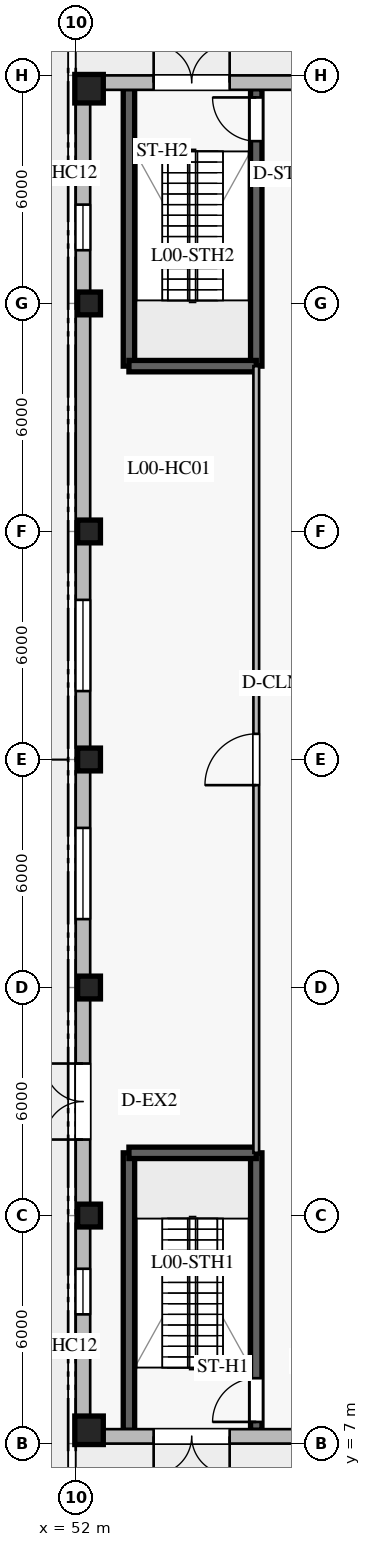
"""IFC4 building model, lengths in metres.
Left out: names, types, materials, properties, quantities, classifications, styles, units other than length and angle.
Written with IfcOpenShell. Run it as: python <this file> out.ifc"""

import sys

from ifc_helpers import new_model, si_unit, direction, frame, frame_2d, origin, origin_2d, place, context, subcontext, project, spatial, rectangle, extrude, element, fill, save


model = new_model("IFC4")
c1 = context("Model", 3, precision=1e-05, world=origin(), true_north=direction((0.0, 1.0)))
c2 = subcontext(c1, "Body", "Model", "MODEL_VIEW")
j1 = project(units=[si_unit("LENGTHUNIT", "METRE"), si_unit("PLANEANGLEUNIT", "RADIAN")], contexts=[c1])
p1 = place(None, origin())
s1 = spatial("IfcSite", under=j1, at=p1, CompositionType="ELEMENT")
p2 = place(p1, origin())
s2 = spatial("IfcBuilding", under=s1, at=p2, CompositionType="ELEMENT")
p3 = place(p2, origin())
s3 = spatial("IfcBuildingStorey", under=s2, at=p3, CompositionType="ELEMENT", Elevation=0.0)
p4 = place(p3, frame((56.75, 7.35, 0.0), z_axis=(0.0, 0.0, 1.0), x_axis=(0.0, 1.0, 0.0)))
e1 = element("IfcWall", 1, at=p4, inside=s3, PredefinedType="SOLIDWALL", context=c2, shape_type="SweptSolid", body=[
    extrude(rectangle(XDim=7.3, YDim=0.3, at=frame_2d((3.65, 0.0))), origin(), (0.0, 0.0, 1.0), 4.94),
])
p5 = place(p4, frame((0.22, 0.0, 0.0)))
e2 = element("IfcOpeningElement", 2, at=p5, cuts=e1, PredefinedType="OPENING", context=c2, shape_type="SweptSolid", body=[
    extrude(rectangle(XDim=1.15, YDim=2.2, at=frame_2d((0.575, 1.1))), frame((0.0, 0.16, 0.0), z_axis=(0.0, -1.0, 0.0), x_axis=(1.0, 0.0, 0.0)), (0.0, 0.0, 1.0), 0.32),
])
p6 = place(p3, frame((53.4, 7.35, 0.0), z_axis=(0.0, 0.0, 1.0), x_axis=(0.0, 1.0, 0.0)))
e3 = element("IfcWall", 3, at=p6, inside=s3, PredefinedType="SOLIDWALL", context=c2, shape_type="SweptSolid", body=[
    extrude(rectangle(XDim=7.3, YDim=0.3, at=frame_2d((3.65, 0.0))), origin(), (0.0, 0.0, 1.0), 4.94),
])
p7 = place(p3, frame((53.4, 14.65, 0.0), z_axis=(0.0, 0.0, 1.0), x_axis=(1.0, 0.0, 0.0)))
e4 = element("IfcWall", 4, at=p7, inside=s3, PredefinedType="SOLIDWALL", context=c2, shape_type="SweptSolid", body=[
    extrude(rectangle(XDim=3.35, YDim=0.3, at=frame_2d((1.675, 0.0))), origin(), (0.0, 0.0, 1.0), 4.94),
])
p8 = place(p3, frame((56.75, 35.35, 0.0), z_axis=(0.0, 0.0, 1.0), x_axis=(0.0, 1.0, 0.0)))
e5 = element("IfcWall", 5, at=p8, inside=s3, PredefinedType="SOLIDWALL", context=c2, shape_type="SweptSolid", body=[
    extrude(rectangle(XDim=7.3, YDim=0.3, at=frame_2d((3.65, 0.0))), origin(), (0.0, 0.0, 1.0), 4.94),
])
p9 = place(p8, frame((5.92, 0.0, 0.0)))
e6 = element("IfcOpeningElement", 6, at=p9, cuts=e5, PredefinedType="OPENING", context=c2, shape_type="SweptSolid", body=[
    extrude(rectangle(XDim=1.15, YDim=2.2, at=frame_2d((0.575, 1.1))), frame((0.0, 0.16, 0.0), z_axis=(0.0, -1.0, 0.0), x_axis=(1.0, 0.0, 0.0)), (0.0, 0.0, 1.0), 0.32),
])
p10 = place(p3, frame((53.4, 35.35, 0.0), z_axis=(0.0, 0.0, 1.0), x_axis=(0.0, 1.0, 0.0)))
e7 = element("IfcWall", 7, at=p10, inside=s3, PredefinedType="SOLIDWALL", context=c2, shape_type="SweptSolid", body=[
    extrude(rectangle(XDim=7.3, YDim=0.3, at=frame_2d((3.65, 0.0))), origin(), (0.0, 0.0, 1.0), 4.94),
])
p11 = place(p3, frame((53.4, 35.35, 0.0), z_axis=(0.0, 0.0, 1.0), x_axis=(1.0, 0.0, 0.0)))
e8 = element("IfcWall", 8, at=p11, inside=s3, PredefinedType="SOLIDWALL", context=c2, shape_type="SweptSolid", body=[
    extrude(rectangle(XDim=3.35, YDim=0.3, at=frame_2d((1.675, 0.0))), origin(), (0.0, 0.0, 1.0), 4.94),
])
p12 = place(p3, frame((52.35, 7.35, 0.0), z_axis=(0.0, 0.0, 1.0), x_axis=(1.0, 0.0, 0.0)))
e9 = element("IfcColumn", 9, at=p12, inside=s3, PredefinedType="COLUMN", context=c2, shape_type="SweptSolid", body=[
    extrude(rectangle(XDim=0.75, YDim=0.75, at=origin_2d()), origin(), (0.0, 0.0, 1.0), 5.2),
])
for number, where, z_axis, x_axis in (
    (10, (52.35, 13.0, 0.0), (0.0, 0.0, 1.0), (1.0, 0.0, 0.0)),
    (11, (52.35, 19.0, 0.0), (0.0, 0.0, 1.0), (1.0, 0.0, 0.0)),
    (12, (52.35, 25.0, 0.0), (0.0, 0.0, 1.0), (1.0, 0.0, 0.0)),
    (13, (52.35, 31.0, 0.0), (0.0, 0.0, 1.0), (1.0, 0.0, 0.0)),
    (14, (52.35, 37.0, 0.0), (0.0, 0.0, 1.0), (1.0, 0.0, 0.0)),
):
    element("IfcColumn", number, at=place(p3, frame(where, z_axis=z_axis, x_axis=x_axis)), inside=s3, PredefinedType="COLUMN", context=c2, shape_type="SweptSolid", body=[
        extrude(rectangle(XDim=0.6, YDim=0.6, at=origin_2d()), origin(), (0.0, 0.0, 1.0), 5.2),
    ])
p13 = place(p3, frame((52.35, 42.65, 0.0), z_axis=(0.0, 0.0, 1.0), x_axis=(1.0, 0.0, 0.0)))
e15 = element("IfcColumn", 15, at=p13, inside=s3, PredefinedType="COLUMN", context=c2, shape_type="SweptSolid", body=[
    extrude(rectangle(XDim=0.75, YDim=0.75, at=origin_2d()), origin(), (0.0, 0.0, 1.0), 5.2),
])
p14 = place(p3, frame((75.0, 7.19, 0.0), z_axis=(0.0, 0.0, 1.0), x_axis=(-1.0, 0.0, 0.0)))
e16 = element("IfcWall", 16, at=p14, inside=s3, PredefinedType="STANDARD", context=c2, shape_type="SweptSolid", body=[
    extrude(rectangle(XDim=23.0, YDim=0.38, at=frame_2d((11.5, 0.0))), origin(), (0.0, 0.0, 1.0), 4.94),
])
p15 = place(p14, frame((18.95, 0.0, 0.0)))
e17 = element("IfcOpeningElement", 17, at=p15, cuts=e16, PredefinedType="OPENING", context=c2, shape_type="SweptSolid", body=[
    extrude(rectangle(XDim=2.0, YDim=2.4, at=frame_2d((1.0, 1.2))), frame((0.0, 0.2, 0.0), z_axis=(0.0, -1.0, 0.0), x_axis=(1.0, 0.0, 0.0)), (0.0, 0.0, 1.0), 0.4),
])
p16 = place(p14, frame((10.3, 0.0, 0.95)))
e18 = element("IfcOpeningElement", 18, at=p16, cuts=e16, PredefinedType="OPENING", context=c2, shape_type="SweptSolid", body=[
    extrude(rectangle(XDim=2.4, YDim=1.8, at=frame_2d((1.2, 0.9))), frame((0.0, 0.2, 0.0), z_axis=(0.0, -1.0, 0.0), x_axis=(1.0, 0.0, 0.0)), (0.0, 0.0, 1.0), 0.4),
])
p17 = place(p3, frame((52.0, 42.81, 0.0), z_axis=(0.0, 0.0, 1.0), x_axis=(1.0, 0.0, 0.0)))
e19 = element("IfcWall", 19, at=p17, inside=s3, PredefinedType="STANDARD", context=c2, shape_type="SweptSolid", body=[
    extrude(rectangle(XDim=23.0, YDim=0.38, at=frame_2d((11.5, 0.0))), origin(), (0.0, 0.0, 1.0), 4.94),
])
p18 = place(p17, frame((2.05, 0.0, 0.0)))
e20 = element("IfcOpeningElement", 20, at=p18, cuts=e19, PredefinedType="OPENING", context=c2, shape_type="SweptSolid", body=[
    extrude(rectangle(XDim=2.0, YDim=2.4, at=frame_2d((1.0, 1.2))), frame((0.0, 0.2, 0.0), z_axis=(0.0, -1.0, 0.0), x_axis=(1.0, 0.0, 0.0)), (0.0, 0.0, 1.0), 0.4),
])
p19 = place(p17, frame((16.05, 0.0, 0.0)))
e21 = element("IfcOpeningElement", 21, at=p19, cuts=e19, PredefinedType="OPENING", context=c2, shape_type="SweptSolid", body=[
    extrude(rectangle(XDim=6.0, YDim=2.6, at=frame_2d((3.0, 1.3))), frame((0.0, 0.2, 0.0), z_axis=(0.0, -1.0, 0.0), x_axis=(1.0, 0.0, 0.0)), (0.0, 0.0, 1.0), 0.4),
])
p20 = place(p3, frame((52.19, 7.38, 0.0), z_axis=(0.0, 0.0, 1.0), x_axis=(0.0, 1.0, 0.0)))
e22 = element("IfcWall", 22, at=p20, inside=s3, PredefinedType="STANDARD", context=c2, shape_type="SweptSolid", body=[
    extrude(rectangle(XDim=35.24, YDim=0.38, at=frame_2d((17.62, 0.0))), origin(), (0.0, 0.0, 1.0), 4.94),
])
p21 = place(p20, frame((7.62, 0.0, 0.0)))
e23 = element("IfcOpeningElement", 23, at=p21, cuts=e22, PredefinedType="OPENING", context=c2, shape_type="SweptSolid", body=[
    extrude(rectangle(XDim=2.0, YDim=2.5, at=frame_2d((1.0, 1.25))), frame((0.0, 0.2, 0.0), z_axis=(0.0, -1.0, 0.0), x_axis=(1.0, 0.0, 0.0)), (0.0, 0.0, 1.0), 0.4),
])
p22 = place(p20, frame((3.02, 0.0, 0.95)))
e24 = element("IfcOpeningElement", 24, at=p22, cuts=e22, PredefinedType="OPENING", context=c2, shape_type="SweptSolid", body=[
    extrude(rectangle(XDim=1.2, YDim=1.8, at=frame_2d((0.6, 0.9))), frame((0.0, 0.2, 0.0), z_axis=(0.0, -1.0, 0.0), x_axis=(1.0, 0.0, 0.0)), (0.0, 0.0, 1.0), 0.4),
])
p23 = place(p20, frame((13.42, 0.0, 0.95)))
e25 = element("IfcOpeningElement", 25, at=p23, cuts=e22, PredefinedType="OPENING", context=c2, shape_type="SweptSolid", body=[
    extrude(rectangle(XDim=2.4, YDim=1.8, at=frame_2d((1.2, 0.9))), frame((0.0, 0.2, 0.0), z_axis=(0.0, -1.0, 0.0), x_axis=(1.0, 0.0, 0.0)), (0.0, 0.0, 1.0), 0.4),
])
p24 = place(p20, frame((19.42, 0.0, 0.95)))
e26 = element("IfcOpeningElement", 26, at=p24, cuts=e22, PredefinedType="OPENING", context=c2, shape_type="SweptSolid", body=[
    extrude(rectangle(XDim=2.4, YDim=1.8, at=frame_2d((1.2, 0.9))), frame((0.0, 0.2, 0.0), z_axis=(0.0, -1.0, 0.0), x_axis=(1.0, 0.0, 0.0)), (0.0, 0.0, 1.0), 0.4),
])
p25 = place(p20, frame((31.02, 0.0, 0.95)))
e27 = element("IfcOpeningElement", 27, at=p25, cuts=e22, PredefinedType="OPENING", context=c2, shape_type="SweptSolid", body=[
    extrude(rectangle(XDim=1.2, YDim=1.8, at=frame_2d((0.6, 0.9))), frame((0.0, 0.2, 0.0), z_axis=(0.0, -1.0, 0.0), x_axis=(1.0, 0.0, 0.0)), (0.0, 0.0, 1.0), 0.4),
])
p26 = place(p3, frame((56.75, 14.65, 0.0), z_axis=(0.0, 0.0, 1.0), x_axis=(0.0, 1.0, 0.0)))
e28 = element("IfcWall", 28, at=p26, inside=s3, PredefinedType="PARTITIONING", context=c2, shape_type="SweptSolid", body=[
    extrude(rectangle(XDim=20.7, YDim=0.15, at=frame_2d((10.35, 0.0))), origin(), (0.0, 0.0, 1.0), 4.94),
])
p27 = place(p26, frame((9.675, 0.0, 0.0)))
e29 = element("IfcOpeningElement", 29, at=p27, cuts=e28, PredefinedType="OPENING", context=c2, shape_type="SweptSolid", body=[
    extrude(rectangle(XDim=1.35, YDim=2.2, at=frame_2d((0.675, 1.1))), frame((0.0, 0.085, 0.0), z_axis=(0.0, -1.0, 0.0), x_axis=(1.0, 0.0, 0.0)), (0.0, 0.0, 1.0), 0.17),
])
p28 = place(p21, origin())
e30 = element("IfcDoor", 30, at=p28, inside=s3, OperationType="DOUBLE_DOOR_SINGLE_SWING", PredefinedType="DOOR", context=c2, shape_type="SweptSolid", body=[
    extrude(rectangle(XDim=2.0, YDim=2.5, at=frame_2d((1.0, 1.25))), frame((0.0, 0.025, 0.0), z_axis=(0.0, -1.0, 0.0), x_axis=(1.0, 0.0, 0.0)), (0.0, 0.0, 1.0), 0.05),
])
fill(e23, e30)
p29 = place(p15, origin())
e31 = element("IfcDoor", 31, at=p29, inside=s3, OperationType="DOUBLE_DOOR_SINGLE_SWING", PredefinedType="DOOR", context=c2, shape_type="SweptSolid", body=[
    extrude(rectangle(XDim=2.0, YDim=2.4, at=frame_2d((1.0, 1.2))), frame((0.0, 0.025, 0.0), z_axis=(0.0, -1.0, 0.0), x_axis=(1.0, 0.0, 0.0)), (0.0, 0.0, 1.0), 0.05),
])
fill(e17, e31)
p30 = place(p18, origin())
e32 = element("IfcDoor", 32, at=p30, inside=s3, OperationType="DOUBLE_DOOR_SINGLE_SWING", PredefinedType="DOOR", context=c2, shape_type="SweptSolid", body=[
    extrude(rectangle(XDim=2.0, YDim=2.4, at=frame_2d((1.0, 1.2))), frame((0.0, 0.025, 0.0), z_axis=(0.0, -1.0, 0.0), x_axis=(1.0, 0.0, 0.0)), (0.0, 0.0, 1.0), 0.05),
])
fill(e20, e32)
p31 = place(p22, origin())
e33 = element("IfcWindow", 33, at=p31, inside=s3, PartitioningType="SINGLE_PANEL", PredefinedType="WINDOW", context=c2, shape_type="SweptSolid", body=[
    extrude(rectangle(XDim=1.2, YDim=1.8, at=frame_2d((0.6, 0.9))), frame((0.0, 0.03, 0.0), z_axis=(0.0, -1.0, 0.0), x_axis=(1.0, 0.0, 0.0)), (0.0, 0.0, 1.0), 0.06),
])
fill(e24, e33)
p32 = place(p23, origin())
e34 = element("IfcWindow", 34, at=p32, inside=s3, PartitioningType="TRIPLE_PANEL_VERTICAL", PredefinedType="WINDOW", context=c2, shape_type="SweptSolid", body=[
    extrude(rectangle(XDim=2.4, YDim=1.8, at=frame_2d((1.2, 0.9))), frame((0.0, 0.03, 0.0), z_axis=(0.0, -1.0, 0.0), x_axis=(1.0, 0.0, 0.0)), (0.0, 0.0, 1.0), 0.06),
])
fill(e25, e34)
p33 = place(p24, origin())
e35 = element("IfcWindow", 35, at=p33, inside=s3, PartitioningType="TRIPLE_PANEL_VERTICAL", PredefinedType="WINDOW", context=c2, shape_type="SweptSolid", body=[
    extrude(rectangle(XDim=2.4, YDim=1.8, at=frame_2d((1.2, 0.9))), frame((0.0, 0.03, 0.0), z_axis=(0.0, -1.0, 0.0), x_axis=(1.0, 0.0, 0.0)), (0.0, 0.0, 1.0), 0.06),
])
fill(e26, e35)
p34 = place(p25, origin())
e36 = element("IfcWindow", 36, at=p34, inside=s3, PartitioningType="SINGLE_PANEL", PredefinedType="WINDOW", context=c2, shape_type="SweptSolid", body=[
    extrude(rectangle(XDim=1.2, YDim=1.8, at=frame_2d((0.6, 0.9))), frame((0.0, 0.03, 0.0), z_axis=(0.0, -1.0, 0.0), x_axis=(1.0, 0.0, 0.0)), (0.0, 0.0, 1.0), 0.06),
])
fill(e27, e36)
p35 = place(p5, origin())
e37 = element("IfcDoor", 37, at=p35, inside=s3, OperationType="SINGLE_SWING_LEFT", PredefinedType="DOOR", context=c2, shape_type="SweptSolid", body=[
    extrude(rectangle(XDim=1.15, YDim=2.2, at=frame_2d((0.575, 1.1))), frame((0.0, 0.025, 0.0), z_axis=(0.0, -1.0, 0.0), x_axis=(1.0, 0.0, 0.0)), (0.0, 0.0, 1.0), 0.05),
])
fill(e2, e37)
p36 = place(p9, origin())
e38 = element("IfcDoor", 38, at=p36, inside=s3, OperationType="SINGLE_SWING_RIGHT", PredefinedType="DOOR", context=c2, shape_type="SweptSolid", body=[
    extrude(rectangle(XDim=1.15, YDim=2.2, at=frame_2d((0.575, 1.1))), frame((0.0, 0.025, 0.0), z_axis=(0.0, -1.0, 0.0), x_axis=(1.0, 0.0, 0.0)), (0.0, 0.0, 1.0), 0.05),
])
fill(e6, e38)
p37 = place(p27, origin())
e39 = element("IfcDoor", 39, at=p37, inside=s3, OperationType="SINGLE_SWING_LEFT", PredefinedType="DOOR", context=c2, shape_type="SweptSolid", body=[
    extrude(rectangle(XDim=1.35, YDim=2.2, at=frame_2d((0.675, 1.1))), frame((0.0, 0.025, 0.0), z_axis=(0.0, -1.0, 0.0), x_axis=(1.0, 0.0, 0.0)), (0.0, 0.0, 1.0), 0.05),
])
fill(e29, e39)
save(model, sys.argv[1])
